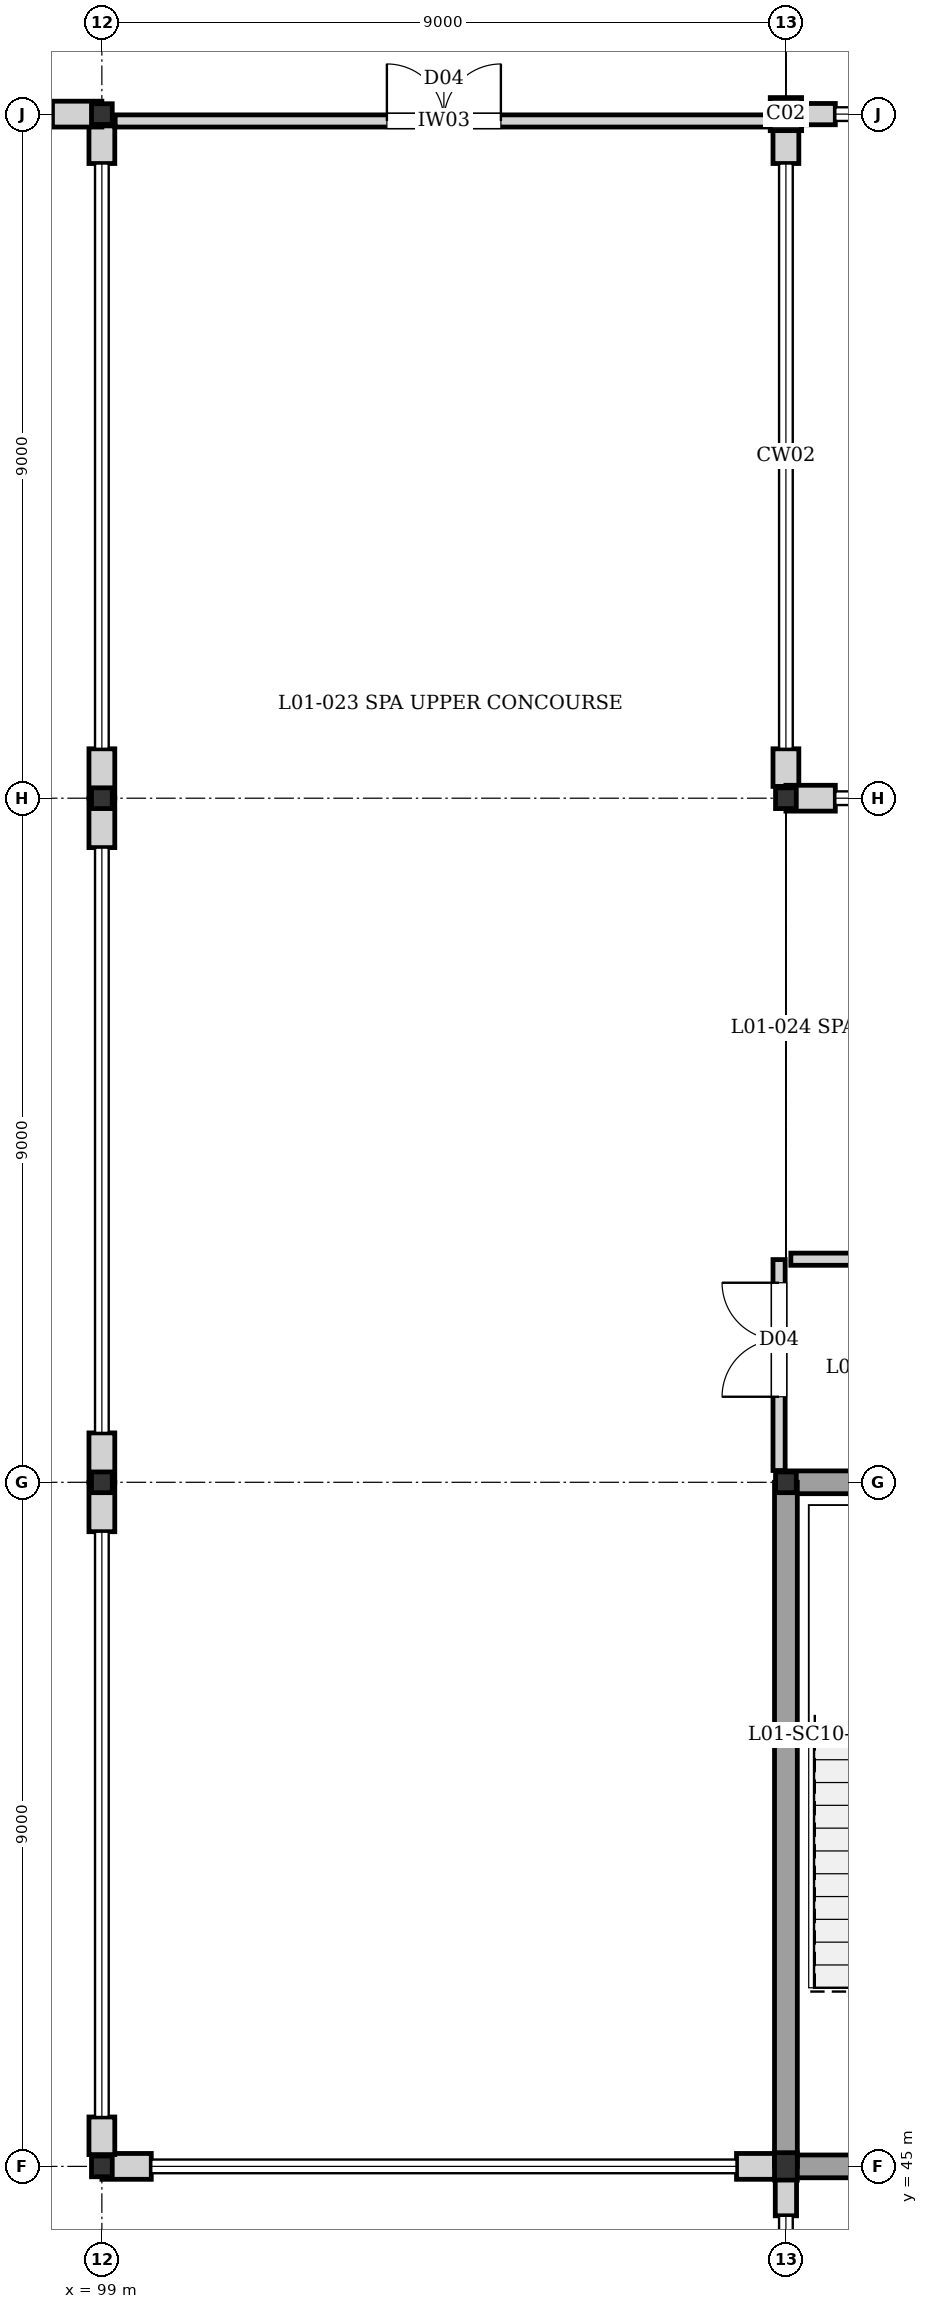
"""IFC4 building model, lengths in metres.
Left out: names, types, materials, properties, quantities, classifications, styles, units other than length and angle.
Written with IfcOpenShell. Run it as: python <this file> out.ifc"""

import sys

from ifc_helpers import new_model, si_unit, direction, frame, frame_2d, origin, origin_2d, place, context, subcontext, project, spatial, rectangle, hollow_circle, i_section, extrude, element, fill, save


model = new_model("IFC4")
c1 = context("Model", 3, precision=1e-05, world=origin(), true_north=direction((0.0, 1.0)))
c2 = subcontext(c1, "Body", "Model", "MODEL_VIEW")
j1 = project(units=[si_unit("LENGTHUNIT", "METRE"), si_unit("PLANEANGLEUNIT", "RADIAN")], contexts=[c1])
p1 = place(None, origin())
s1 = spatial("IfcSite", under=j1, at=p1, CompositionType="ELEMENT")
p2 = place(p1, origin())
s2 = spatial("IfcBuilding", under=s1, at=p2, CompositionType="ELEMENT")
p3 = place(p2, frame((0.0, 0.0, 4.32)))
s3 = spatial("IfcBuildingStorey", under=s2, at=p3, CompositionType="ELEMENT", Elevation=4.32)
for number, where, z_axis, x_axis in (
    (1, (99.0, 45.0, 0.0), (0.0, 0.0, 1.0), (1.0, 0.0, 0.0)),
    (2, (99.0, 54.0, 0.0), (0.0, 0.0, 1.0), (1.0, 0.0, 0.0)),
    (3, (99.0, 63.0, 0.0), (0.0, 0.0, 1.0), (1.0, 0.0, 0.0)),
    (4, (99.0, 72.0, 0.0), (0.0, 0.0, 1.0), (1.0, 0.0, 0.0)),
):
    element("IfcColumn", number, at=place(p3, frame(where, z_axis=z_axis, x_axis=x_axis)), inside=s3, PredefinedType="COLUMN", context=c2, shape_type="SweptSolid", body=[
        extrude(hollow_circle(Radius=0.136, WallThickness=0.012, at=origin_2d()), origin(), (0.0, 0.0, 1.0), 3.84),
    ])
p4 = place(p3, frame((108.0, 45.0, 0.0), z_axis=(0.0, 0.0, 1.0), x_axis=(1.0, 0.0, 0.0)))
e5 = element("IfcColumn", 5, at=p4, inside=s3, PredefinedType="COLUMN", context=c2, shape_type="SweptSolid", body=[
    extrude(i_section(OverallWidth=0.3, OverallDepth=0.36, WebThickness=0.012, FlangeThickness=0.022, at=origin_2d()), origin(), (0.0, 0.0, 1.0), 3.84),
])
for number, where, z_axis, x_axis in (
    (6, (108.0, 54.0, 0.0), (0.0, 0.0, 1.0), (1.0, 0.0, 0.0)),
    (7, (108.0, 63.0, 0.0), (0.0, 0.0, 1.0), (1.0, 0.0, 0.0)),
):
    element("IfcColumn", number, at=place(p3, frame(where, z_axis=z_axis, x_axis=x_axis)), inside=s3, PredefinedType="COLUMN", context=c2, shape_type="SweptSolid", body=[
        extrude(hollow_circle(Radius=0.136, WallThickness=0.012, at=origin_2d()), origin(), (0.0, 0.0, 1.0), 3.84),
    ])
p5 = place(p3, frame((108.0, 72.0, 0.0), z_axis=(0.0, 0.0, 1.0), x_axis=(1.0, 0.0, 0.0)))
e8 = element("IfcColumn", 8, at=p5, inside=s3, PredefinedType="COLUMN", context=c2, shape_type="SweptSolid", body=[
    extrude(i_section(OverallWidth=0.412, OverallDepth=0.435, WebThickness=0.027, FlangeThickness=0.046, at=origin_2d()), origin(), (0.0, 0.0, 1.0), 3.84),
])
p6 = place(p3, frame((108.65, 72.0, 0.0), z_axis=(0.0, 0.0, 1.0), x_axis=(-1.0, 0.0, 0.0)))
e9 = element("IfcWall", 9, at=p6, inside=s3, PredefinedType="SOLIDWALL", context=c2, shape_type="SweptSolid", body=[
    extrude(rectangle(XDim=0.65, YDim=0.28, at=frame_2d((0.325, 0.0))), origin(), (0.0, 0.0, 1.0), 3.18),
])
for number, where, z_axis, x_axis in (
    (10, (108.0, 71.845, 0.0), (0.0, 0.0, 1.0), (0.0, -1.0, 0.0)),
    (11, (108.0, 63.65, 0.0), (0.0, 0.0, 1.0), (0.0, -1.0, 0.0)),
):
    element("IfcWall", number, at=place(p3, frame(where, z_axis=z_axis, x_axis=x_axis)), inside=s3, PredefinedType="SOLIDWALL", context=c2, shape_type="SweptSolid", body=[
        extrude(rectangle(XDim=0.495, YDim=0.34, at=frame_2d((0.248, 0.0))), origin(), (0.0, 0.0, 1.0), 3.59),
    ])
p7 = place(p3, frame((108.0, 63.0, 0.0), z_axis=(0.0, 0.0, 1.0), x_axis=(1.0, 0.0, 0.0)))
e12 = element("IfcWall", 12, at=p7, inside=s3, PredefinedType="SOLIDWALL", context=c2, shape_type="SweptSolid", body=[
    extrude(rectangle(XDim=0.65, YDim=0.34, at=frame_2d((0.325, 0.0))), origin(), (0.0, 0.0, 1.0), 3.18),
])
p8 = place(p3, frame((108.0, 44.35, 0.0), z_axis=(0.0, 0.0, 1.0), x_axis=(0.0, 1.0, 0.0)))
e13 = element("IfcWall", 13, at=p8, inside=s3, PredefinedType="SOLIDWALL", context=c2, shape_type="SweptSolid", body=[
    extrude(rectangle(XDim=0.52, YDim=0.28, at=frame_2d((0.26, 0.0))), origin(), (0.0, 0.0, 1.0), 3.6),
])
p9 = place(p3, frame((107.87, 45.0, 0.0), z_axis=(0.0, 0.0, 1.0), x_axis=(-1.0, 0.0, 0.0)))
e14 = element("IfcWall", 14, at=p9, inside=s3, PredefinedType="SOLIDWALL", context=c2, shape_type="SweptSolid", body=[
    extrude(rectangle(XDim=0.52, YDim=0.34, at=frame_2d((0.26, 0.0))), origin(), (0.0, 0.0, 1.0), 3.22),
])
p10 = place(p3, frame((99.65, 45.0, 0.0), z_axis=(0.0, 0.0, 1.0), x_axis=(-1.0, 0.0, 0.0)))
e15 = element("IfcWall", 15, at=p10, inside=s3, PredefinedType="SOLIDWALL", context=c2, shape_type="SweptSolid", body=[
    extrude(rectangle(XDim=0.65, YDim=0.34, at=frame_2d((0.325, 0.0))), origin(), (0.0, 0.0, 1.0), 3.22),
])
p11 = place(p3, frame((99.0, 45.155, 0.0), z_axis=(0.0, 0.0, 1.0), x_axis=(0.0, 1.0, 0.0)))
e16 = element("IfcWall", 16, at=p11, inside=s3, PredefinedType="SOLIDWALL", context=c2, shape_type="SweptSolid", body=[
    extrude(rectangle(XDim=0.495, YDim=0.34, at=frame_2d((0.248, 0.0))), origin(), (0.0, 0.0, 1.0), 3.59),
])
p12 = place(p3, frame((99.0, 53.35, 0.0), z_axis=(0.0, 0.0, 1.0), x_axis=(0.0, 1.0, 0.0)))
e17 = element("IfcWall", 17, at=p12, inside=s3, PredefinedType="SOLIDWALL", context=c2, shape_type="SweptSolid", body=[
    extrude(rectangle(XDim=0.65, YDim=0.34, at=frame_2d((0.325, 0.0))), origin(), (0.0, 0.0, 1.0), 3.28),
])
for number, where, z_axis, x_axis in (
    (18, (99.0, 54.0, 0.0), (0.0, 0.0, 1.0), (0.0, 1.0, 0.0)),
    (19, (99.0, 62.35, 0.0), (0.0, 0.0, 1.0), (0.0, 1.0, 0.0)),
):
    element("IfcWall", number, at=place(p3, frame(where, z_axis=z_axis, x_axis=x_axis)), inside=s3, PredefinedType="SOLIDWALL", context=c2, shape_type="SweptSolid", body=[
        extrude(rectangle(XDim=0.65, YDim=0.34, at=frame_2d((0.325, 0.0))), origin(), (0.0, 0.0, 1.0), 3.22),
    ])
p13 = place(p3, frame((99.0, 63.0, 0.0), z_axis=(0.0, 0.0, 1.0), x_axis=(0.0, 1.0, 0.0)))
e20 = element("IfcWall", 20, at=p13, inside=s3, PredefinedType="SOLIDWALL", context=c2, shape_type="SweptSolid", body=[
    extrude(rectangle(XDim=0.65, YDim=0.34, at=frame_2d((0.325, 0.0))), origin(), (0.0, 0.0, 1.0), 3.18),
])
p14 = place(p3, frame((99.0, 71.35, 0.0), z_axis=(0.0, 0.0, 1.0), x_axis=(0.0, 1.0, 0.0)))
e21 = element("IfcWall", 21, at=p14, inside=s3, PredefinedType="SOLIDWALL", context=c2, shape_type="SweptSolid", body=[
    extrude(rectangle(XDim=0.495, YDim=0.34, at=frame_2d((0.248, 0.0))), origin(), (0.0, 0.0, 1.0), 3.59),
])
p15 = place(p3, frame((99.0, 72.0, 0.0), z_axis=(0.0, 0.0, 1.0), x_axis=(-1.0, 0.0, 0.0)))
e22 = element("IfcWall", 22, at=p15, inside=s3, PredefinedType="SOLIDWALL", context=c2, shape_type="SweptSolid", body=[
    extrude(rectangle(XDim=0.65, YDim=0.34, at=frame_2d((0.325, 0.0))), origin(), (0.0, 0.0, 1.0), 3.28),
])
for number, where, z_axis, x_axis in (
    (23, (108.0, 45.0, 0.0), (0.0, 0.0, 1.0), (1.0, 0.0, 0.0)),
    (24, (108.0, 54.0, 0.0), (0.0, 0.0, 1.0), (1.0, 0.0, 0.0)),
    (25, (108.0, 45.0, 0.0), (0.0, 0.0, 1.0), (0.0, 1.0, 0.0)),
):
    element("IfcWall", number, at=place(p3, frame(where, z_axis=z_axis, x_axis=x_axis)), inside=s3, PredefinedType="SHEAR", context=c2, shape_type="SweptSolid", body=[
        extrude(rectangle(XDim=9.0, YDim=0.3, at=frame_2d((4.5, 0.0))), origin(), (0.0, 0.0, 1.0), 3.59),
    ])
p16 = place(p3, frame((99.175, 71.91, 0.0), z_axis=(0.0, 0.0, 1.0), x_axis=(1.0, 0.0, 0.0)))
e26 = element("IfcWall", 26, at=p16, inside=s3, PredefinedType="PARTITIONING", context=c2, shape_type="SweptSolid", body=[
    extrude(rectangle(XDim=8.65, YDim=0.16, at=frame_2d((4.325, 0.0))), origin(), (0.0, 0.0, 1.0), 3.22),
])
p17 = place(p16, frame((3.575, 0.0, 0.0)))
e27 = element("IfcOpeningElement", 27, at=p17, cuts=e26, PredefinedType="OPENING", context=c2, shape_type="SweptSolid", body=[
    extrude(rectangle(XDim=1.5, YDim=2.1, at=frame_2d((0.75, 1.05))), frame((0.0, 0.09, 0.0), z_axis=(0.0, -1.0, 0.0), x_axis=(1.0, 0.0, 0.0)), (0.0, 0.0, 1.0), 0.18),
])
p18 = place(p3, frame((107.91, 54.155, 0.0), z_axis=(0.0, 0.0, 1.0), x_axis=(0.0, 1.0, 0.0)))
e28 = element("IfcWall", 28, at=p18, inside=s3, PredefinedType="PARTITIONING", context=c2, shape_type="SweptSolid", body=[
    extrude(rectangle(XDim=2.775, YDim=0.16, at=frame_2d((1.387, 0.0))), origin(), (0.0, 0.0, 1.0), 3.22),
])
p19 = place(p18, frame((0.97, 0.0, 0.0)))
e29 = element("IfcOpeningElement", 29, at=p19, cuts=e28, PredefinedType="OPENING", context=c2, shape_type="SweptSolid", body=[
    extrude(rectangle(XDim=1.5, YDim=2.1, at=frame_2d((0.75, 1.05))), frame((0.0, 0.09, 0.0), z_axis=(0.0, -1.0, 0.0), x_axis=(1.0, 0.0, 0.0)), (0.0, 0.0, 1.0), 0.18),
])
p20 = place(p3, frame((108.065, 56.935, 0.0), z_axis=(0.0, 0.0, 1.0), x_axis=(1.0, 0.0, 0.0)))
e30 = element("IfcWall", 30, at=p20, inside=s3, PredefinedType="PARTITIONING", context=c2, shape_type="SweptSolid", body=[
    extrude(rectangle(XDim=17.835, YDim=0.16, at=frame_2d((8.917, 0.0))), origin(), (0.0, 0.0, 1.0), 3.59),
])
p21 = place(p20, frame((14.785, 0.0, 0.0)))
e31 = element("IfcOpeningElement", 31, at=p21, cuts=e30, PredefinedType="OPENING", context=c2, shape_type="SweptSolid", body=[
    extrude(rectangle(XDim=1.3, YDim=2.25, at=frame_2d((0.65, 1.125))), frame((0.0, 0.09, 0.0), z_axis=(0.0, -1.0, 0.0), x_axis=(1.0, 0.0, 0.0)), (0.0, 0.0, 1.0), 0.18),
])
p22 = place(p17, origin())
e32 = element("IfcDoor", 32, at=p22, inside=s3, OperationType="DOUBLE_DOOR_SINGLE_SWING", PredefinedType="DOOR", context=c2, shape_type="SweptSolid", body=[
    extrude(rectangle(XDim=1.5, YDim=2.1, at=frame_2d((0.75, 1.05))), frame((0.0, 0.025, 0.0), z_axis=(0.0, -1.0, 0.0), x_axis=(1.0, 0.0, 0.0)), (0.0, 0.0, 1.0), 0.05),
])
fill(e27, e32)
p23 = place(p19, origin())
e33 = element("IfcDoor", 33, at=p23, inside=s3, OperationType="DOUBLE_DOOR_SINGLE_SWING", PredefinedType="DOOR", context=c2, shape_type="SweptSolid", body=[
    extrude(rectangle(XDim=1.5, YDim=2.1, at=frame_2d((0.75, 1.05))), frame((0.0, 0.025, 0.0), z_axis=(0.0, -1.0, 0.0), x_axis=(1.0, 0.0, 0.0)), (0.0, 0.0, 1.0), 0.05),
])
fill(e29, e33)
save(model, sys.argv[1])
